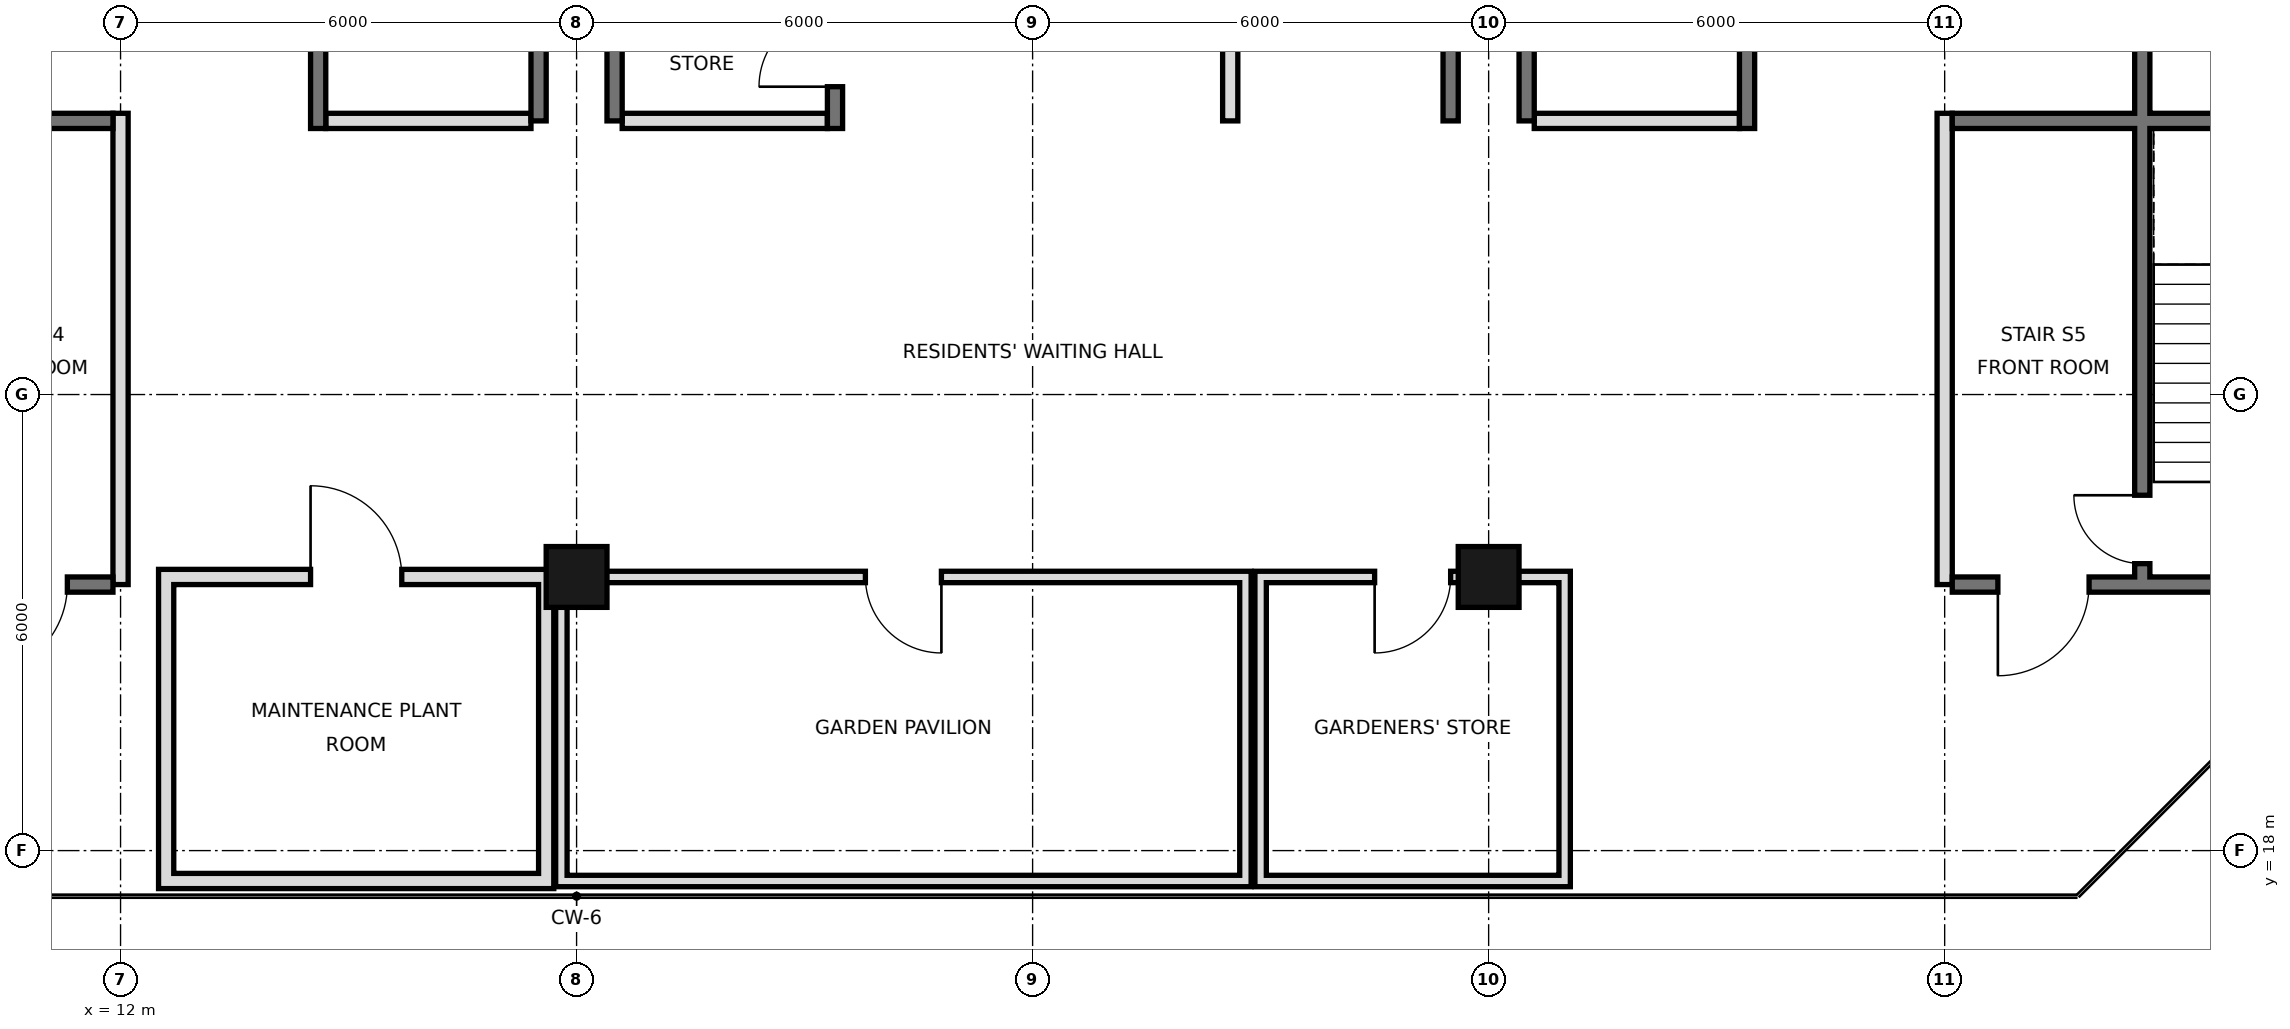
"""IFC4 building model, lengths in metres.
Left out: names, types, materials, properties, quantities, classifications, styles, units other than length and angle.
Written with IfcOpenShell. Run it as: python <this file> out.ifc"""

import sys

from ifc_helpers import new_model, si_unit, direction, frame, frame_2d, origin, origin_2d, place, context, subcontext, project, spatial, rectangle, hollow_rectangle, extrude, element, fill, save


model = new_model("IFC4")
c1 = context("Model", 3, precision=1e-05, world=origin(), true_north=direction((0.0, 1.0)))
c2 = subcontext(c1, "Body", "Model", "MODEL_VIEW")
j1 = project(units=[si_unit("LENGTHUNIT", "METRE"), si_unit("PLANEANGLEUNIT", "RADIAN")], contexts=[c1])
p1 = place(None, origin())
s1 = spatial("IfcSite", under=j1, at=p1, CompositionType="ELEMENT")
p2 = place(p1, origin())
s2 = spatial("IfcBuilding", under=s1, at=p2, CompositionType="ELEMENT")
p3 = place(p2, frame((0.0, 0.0, 345.8)))
s3 = spatial("IfcBuildingStorey", under=s2, at=p3, CompositionType="ELEMENT", Elevation=345.8)
for number, where, z_axis, x_axis in (
    (1, (18.0, 21.6, 0.0), (0.0, 0.0, 1.0), (1.0, 0.0, 0.0)),
    (2, (30.0, 21.6, 0.0), (0.0, 0.0, 1.0), (1.0, 0.0, 0.0)),
):
    element("IfcColumn", number, at=place(p3, frame(where, z_axis=z_axis, x_axis=x_axis)), inside=s3, PredefinedType="COLUMN", context=c2, shape_type="SweptSolid", body=[
        extrude(hollow_rectangle(XDim=0.8, YDim=0.8, WallThickness=0.025, at=origin_2d()), origin(), (0.0, 0.0, 1.0), 4.0),
    ])
p4 = place(p3, frame((42.397, 17.69, 0.0), z_axis=(0.0, 0.0, 1.0), x_axis=(-0.707106781187, -0.707106781187, 0.0)))
e3 = element("IfcWall", 3, at=p4, inside=s3, PredefinedType="PARAPET", context=c2, shape_type="SweptSolid", body=[
    extrude(rectangle(XDim=8.61, YDim=0.2, at=frame_2d((4.305, 0.0))), origin(), (0.0, 0.0, 1.0), 1.1),
])
for number, where, z_axis, x_axis in (
    (4, (12.6, 17.5, 0.0), (0.0, 0.0, 1.0), (0.0, 1.0, 0.0)),
    (5, (17.6, 17.5, 0.0), (0.0, 0.0, 1.0), (0.0, 1.0, 0.0)),
):
    element("IfcWall", number, at=place(p3, frame(where, z_axis=z_axis, x_axis=x_axis)), inside=s3, PredefinedType="SOLIDWALL", context=c2, shape_type="SweptSolid", body=[
        extrude(rectangle(XDim=4.2, YDim=0.2, at=frame_2d((2.1, 0.0))), origin(), (0.0, 0.0, 1.0), 3.05),
    ])
p5 = place(p3, frame((17.8, 17.525, 0.0), z_axis=(0.0, 0.0, 1.0), x_axis=(0.0, 1.0, 0.0)))
e6 = element("IfcWall", 6, at=p5, inside=s3, PredefinedType="PARTITIONING", context=c2, shape_type="SweptSolid", body=[
    extrude(rectangle(XDim=4.15, YDim=0.15, at=frame_2d((2.075, 0.0))), origin(), (0.0, 0.0, 1.0), 3.15),
])
for number, where, z_axis, x_axis in (
    (7, (26.8, 17.525, 0.0), (0.0, 0.0, 1.0), (0.0, 1.0, 0.0)),
    (8, (27.0, 17.525, 0.0), (0.0, 0.0, 1.0), (0.0, 1.0, 0.0)),
    (9, (31.0, 17.525, 0.0), (0.0, 0.0, 1.0), (0.0, 1.0, 0.0)),
):
    element("IfcWall", number, at=place(p3, frame(where, z_axis=z_axis, x_axis=x_axis)), inside=s3, PredefinedType="PARTITIONING", context=c2, shape_type="SweptSolid", body=[
        extrude(rectangle(XDim=4.15, YDim=0.15, at=frame_2d((2.075, 0.0))), origin(), (0.0, 0.0, 1.0), 3.75),
    ])
p6 = place(p3, frame((12.7, 17.6, 0.0), z_axis=(0.0, 0.0, 1.0), x_axis=(1.0, 0.0, 0.0)))
e10 = element("IfcWall", 10, at=p6, inside=s3, PredefinedType="SOLIDWALL", context=c2, shape_type="SweptSolid", body=[
    extrude(rectangle(XDim=4.8, YDim=0.2, at=frame_2d((2.4, 0.0))), origin(), (0.0, 0.0, 1.0), 3.75),
])
p7 = place(p3, frame((17.875, 17.6, 0.0), z_axis=(0.0, 0.0, 1.0), x_axis=(1.0, 0.0, 0.0)))
e11 = element("IfcWall", 11, at=p7, inside=s3, PredefinedType="PARTITIONING", context=c2, shape_type="SweptSolid", body=[
    extrude(rectangle(XDim=8.85, YDim=0.15, at=frame_2d((4.425, 0.0))), origin(), (0.0, 0.0, 1.0), 3.75),
])
p8 = place(p3, frame((27.075, 17.6, 0.0), z_axis=(0.0, 0.0, 1.0), x_axis=(1.0, 0.0, 0.0)))
e12 = element("IfcWall", 12, at=p8, inside=s3, PredefinedType="PARTITIONING", context=c2, shape_type="SweptSolid", body=[
    extrude(rectangle(XDim=3.85, YDim=0.15, at=frame_2d((1.925, 0.0))), origin(), (0.0, 0.0, 1.0), 3.75),
])
p9 = place(p3, frame((12.7, 21.6, 0.0), z_axis=(0.0, 0.0, 1.0), x_axis=(1.0, 0.0, 0.0)))
e13 = element("IfcWall", 13, at=p9, inside=s3, PredefinedType="SOLIDWALL", context=c2, shape_type="SweptSolid", body=[
    extrude(rectangle(XDim=4.8, YDim=0.2, at=frame_2d((2.4, 0.0))), origin(), (0.0, 0.0, 1.0), 3.75),
])
p10 = place(p9, frame((1.8, 0.0, 0.0)))
e14 = element("IfcOpeningElement", 14, at=p10, cuts=e13, PredefinedType="OPENING", context=c2, shape_type="SweptSolid", body=[
    extrude(rectangle(XDim=1.2, YDim=2.4, at=frame_2d((0.6, 1.2))), frame((0.0, 0.11, 0.0), z_axis=(0.0, -1.0, 0.0), x_axis=(1.0, 0.0, 0.0)), (0.0, 0.0, 1.0), 0.22),
])
p11 = place(p3, frame((17.875, 21.6, 0.0), z_axis=(0.0, 0.0, 1.0), x_axis=(1.0, 0.0, 0.0)))
e15 = element("IfcWall", 15, at=p11, inside=s3, PredefinedType="PARTITIONING", context=c2, shape_type="SweptSolid", body=[
    extrude(rectangle(XDim=8.85, YDim=0.15, at=frame_2d((4.425, 0.0))), origin(), (0.0, 0.0, 1.0), 3.75),
])
p12 = place(p11, frame((3.925, 0.0, 0.0)))
e16 = element("IfcOpeningElement", 16, at=p12, cuts=e15, PredefinedType="OPENING", context=c2, shape_type="SweptSolid", body=[
    extrude(rectangle(XDim=1.0, YDim=2.4, at=frame_2d((0.5, 1.2))), frame((0.0, 0.085, 0.0), z_axis=(0.0, -1.0, 0.0), x_axis=(1.0, 0.0, 0.0)), (0.0, 0.0, 1.0), 0.17),
])
p13 = place(p3, frame((27.075, 21.6, 0.0), z_axis=(0.0, 0.0, 1.0), x_axis=(1.0, 0.0, 0.0)))
e17 = element("IfcWall", 17, at=p13, inside=s3, PredefinedType="PARTITIONING", context=c2, shape_type="SweptSolid", body=[
    extrude(rectangle(XDim=3.85, YDim=0.15, at=frame_2d((1.925, 0.0))), origin(), (0.0, 0.0, 1.0), 3.75),
])
p14 = place(p13, frame((1.425, 0.0, 0.0)))
e18 = element("IfcOpeningElement", 18, at=p14, cuts=e17, PredefinedType="OPENING", context=c2, shape_type="SweptSolid", body=[
    extrude(rectangle(XDim=1.0, YDim=2.4, at=frame_2d((0.5, 1.2))), frame((0.0, 0.085, 0.0), z_axis=(0.0, -1.0, 0.0), x_axis=(1.0, 0.0, 0.0)), (0.0, 0.0, 1.0), 0.17),
])
for number, where, z_axis, x_axis in (
    (19, (17.5, 27.6, 0.0), (0.0, 0.0, 1.0), (0.0, 1.0, 0.0)),
    (20, (18.5, 27.6, 0.0), (0.0, 0.0, 1.0), (0.0, 1.0, 0.0)),
    (21, (29.5, 27.6, 0.0), (0.0, 0.0, 1.0), (0.0, 1.0, 0.0)),
    (22, (30.5, 27.6, 0.0), (0.0, 0.0, 1.0), (0.0, 1.0, 0.0)),
):
    element("IfcWall", number, at=place(p3, frame(where, z_axis=z_axis, x_axis=x_axis)), inside=s3, PredefinedType="SOLIDWALL", context=c2, shape_type="SweptSolid", body=[
        extrude(rectangle(XDim=17.5, YDim=0.2, at=frame_2d((8.75, 0.0))), origin(), (0.0, 0.0, 1.0), 3.75),
    ])
p15 = place(p3, frame((12.0, 21.5, 0.0), z_axis=(0.0, 0.0, 1.0), x_axis=(0.0, 1.0, 0.0)))
e23 = element("IfcWall", 23, at=p15, inside=s3, PredefinedType="PARTITIONING", context=c2, shape_type="SweptSolid", body=[
    extrude(rectangle(XDim=6.2, YDim=0.2, at=frame_2d((3.1, 0.0))), origin(), (0.0, 0.0, 1.0), 3.75),
])
p16 = place(p3, frame((14.6, 27.5, 0.0), z_axis=(0.0, 0.0, 1.0), x_axis=(0.0, 1.0, 0.0)))
e24 = element("IfcWall", 24, at=p16, inside=s3, PredefinedType="SOLIDWALL", context=c2, shape_type="SweptSolid", body=[
    extrude(rectangle(XDim=17.5, YDim=0.2, at=frame_2d((8.75, 0.0))), origin(), (0.0, 0.0, 1.0), 3.75),
])
p17 = place(p16, frame((15.4, 0.0, 0.0)))
e25 = element("IfcOpeningElement", 25, at=p17, cuts=e24, PredefinedType="OPENING", context=c2, shape_type="SweptSolid", body=[
    extrude(rectangle(XDim=1.1, YDim=2.1, at=frame_2d((0.55, 1.05))), frame((0.0, 0.11, 0.0), z_axis=(0.0, -1.0, 0.0), x_axis=(1.0, 0.0, 0.0)), (0.0, 0.0, 1.0), 0.22),
])
p18 = place(p16, frame((2.7, 0.0, 0.0)))
e26 = element("IfcOpeningElement", 26, at=p18, cuts=e24, PredefinedType="OPENING", context=c2, shape_type="SweptSolid", body=[
    extrude(rectangle(XDim=1.0, YDim=2.1, at=frame_2d((0.5, 1.05))), frame((0.0, 0.11, 0.0), z_axis=(0.0, -1.0, 0.0), x_axis=(1.0, 0.0, 0.0)), (0.0, 0.0, 1.0), 0.22),
])
p19 = place(p3, frame((21.4, 27.5, 0.0), z_axis=(0.0, 0.0, 1.0), x_axis=(0.0, 1.0, 0.0)))
e27 = element("IfcWall", 27, at=p19, inside=s3, PredefinedType="SOLIDWALL", context=c2, shape_type="SweptSolid", body=[
    extrude(rectangle(XDim=17.5, YDim=0.2, at=frame_2d((8.75, 0.0))), origin(), (0.0, 0.0, 1.0), 3.75),
])
p20 = place(p19, frame((0.55, 0.0, 0.0)))
e28 = element("IfcOpeningElement", 28, at=p20, cuts=e27, PredefinedType="OPENING", context=c2, shape_type="SweptSolid", body=[
    extrude(rectangle(XDim=1.0, YDim=2.1, at=frame_2d((0.5, 1.05))), frame((0.0, 0.11, 0.0), z_axis=(0.0, -1.0, 0.0), x_axis=(1.0, 0.0, 0.0)), (0.0, 0.0, 1.0), 0.22),
])
p21 = place(p19, frame((3.65, 0.0, 0.0)))
e29 = element("IfcOpeningElement", 29, at=p21, cuts=e27, PredefinedType="OPENING", context=c2, shape_type="SweptSolid", body=[
    extrude(rectangle(XDim=1.0, YDim=2.1, at=frame_2d((0.5, 1.05))), frame((0.0, 0.11, 0.0), z_axis=(0.0, -1.0, 0.0), x_axis=(1.0, 0.0, 0.0)), (0.0, 0.0, 1.0), 0.22),
])
p22 = place(p19, frame((9.8, 0.0, 0.0)))
e30 = element("IfcOpeningElement", 30, at=p22, cuts=e27, PredefinedType="OPENING", context=c2, shape_type="SweptSolid", body=[
    extrude(rectangle(XDim=1.0, YDim=2.1, at=frame_2d((0.5, 1.05))), frame((0.0, 0.11, 0.0), z_axis=(0.0, -1.0, 0.0), x_axis=(1.0, 0.0, 0.0)), (0.0, 0.0, 1.0), 0.22),
])
p23 = place(p3, frame((26.6, 27.6, 0.0), z_axis=(0.0, 0.0, 1.0), x_axis=(0.0, 1.0, 0.0)))
e31 = element("IfcWall", 31, at=p23, inside=s3, PredefinedType="PARTITIONING", context=c2, shape_type="SweptSolid", body=[
    extrude(rectangle(XDim=17.4, YDim=0.2, at=frame_2d((8.7, 0.0))), origin(), (0.0, 0.0, 1.0), 3.75),
])
p24 = place(p23, frame((10.25, 0.0, 0.0)))
e32 = element("IfcOpeningElement", 32, at=p24, cuts=e31, PredefinedType="OPENING", context=c2, shape_type="SweptSolid", body=[
    extrude(rectangle(XDim=1.0, YDim=2.1, at=frame_2d((0.5, 1.05))), frame((0.0, 0.11, 0.0), z_axis=(0.0, -1.0, 0.0), x_axis=(1.0, 0.0, 0.0)), (0.0, 0.0, 1.0), 0.22),
])
p25 = place(p23, frame((15.375, 0.0, 0.0)))
e33 = element("IfcOpeningElement", 33, at=p25, cuts=e31, PredefinedType="OPENING", context=c2, shape_type="SweptSolid", body=[
    extrude(rectangle(XDim=1.0, YDim=2.1, at=frame_2d((0.5, 1.05))), frame((0.0, 0.11, 0.0), z_axis=(0.0, -1.0, 0.0), x_axis=(1.0, 0.0, 0.0)), (0.0, 0.0, 1.0), 0.22),
])
p26 = place(p3, frame((33.4, 27.5, 0.0), z_axis=(0.0, 0.0, 1.0), x_axis=(0.0, 1.0, 0.0)))
e34 = element("IfcWall", 34, at=p26, inside=s3, PredefinedType="SOLIDWALL", context=c2, shape_type="SweptSolid", body=[
    extrude(rectangle(XDim=17.5, YDim=0.2, at=frame_2d((8.75, 0.0))), origin(), (0.0, 0.0, 1.0), 3.75),
])
p27 = place(p26, frame((15.4, 0.0, 0.0)))
e35 = element("IfcOpeningElement", 35, at=p27, cuts=e34, PredefinedType="OPENING", context=c2, shape_type="SweptSolid", body=[
    extrude(rectangle(XDim=1.1, YDim=2.1, at=frame_2d((0.55, 1.05))), frame((0.0, 0.11, 0.0), z_axis=(0.0, -1.0, 0.0), x_axis=(1.0, 0.0, 0.0)), (0.0, 0.0, 1.0), 0.22),
])
p28 = place(p26, frame((2.7, 0.0, 0.0)))
e36 = element("IfcOpeningElement", 36, at=p28, cuts=e34, PredefinedType="OPENING", context=c2, shape_type="SweptSolid", body=[
    extrude(rectangle(XDim=1.0, YDim=2.1, at=frame_2d((0.5, 1.05))), frame((0.0, 0.11, 0.0), z_axis=(0.0, -1.0, 0.0), x_axis=(1.0, 0.0, 0.0)), (0.0, 0.0, 1.0), 0.22),
])
p29 = place(p3, frame((36.0, 21.5, 0.0), z_axis=(0.0, 0.0, 1.0), x_axis=(0.0, 1.0, 0.0)))
e37 = element("IfcWall", 37, at=p29, inside=s3, PredefinedType="PARTITIONING", context=c2, shape_type="SweptSolid", body=[
    extrude(rectangle(XDim=6.2, YDim=0.2, at=frame_2d((3.1, 0.0))), origin(), (0.0, 0.0, 1.0), 3.75),
])
p30 = place(p3, frame((38.6, 21.5, 0.0), z_axis=(0.0, 0.0, 1.0), x_axis=(0.0, 1.0, 0.0)))
e38 = element("IfcWall", 38, at=p30, inside=s3, PredefinedType="SOLIDWALL", context=c2, shape_type="SweptSolid", body=[
    extrude(rectangle(XDim=23.5, YDim=0.2, at=frame_2d((11.75, 0.0))), origin(), (0.0, 0.0, 1.0), 3.75),
])
p31 = place(p30, frame((8.7, 0.0, 0.0)))
e39 = element("IfcOpeningElement", 39, at=p31, cuts=e38, PredefinedType="OPENING", context=c2, shape_type="SweptSolid", body=[
    extrude(rectangle(XDim=1.0, YDim=2.1, at=frame_2d((0.5, 1.05))), frame((0.0, 0.11, 0.0), z_axis=(0.0, -1.0, 0.0), x_axis=(1.0, 0.0, 0.0)), (0.0, 0.0, 1.0), 0.22),
])
p32 = place(p30, frame((13.35, 0.0, 0.0)))
e40 = element("IfcOpeningElement", 40, at=p32, cuts=e38, PredefinedType="OPENING", context=c2, shape_type="SweptSolid", body=[
    extrude(rectangle(XDim=1.0, YDim=2.1, at=frame_2d((0.5, 1.05))), frame((0.0, 0.11, 0.0), z_axis=(0.0, -1.0, 0.0), x_axis=(1.0, 0.0, 0.0)), (0.0, 0.0, 1.0), 0.22),
])
p33 = place(p30, frame((15.8, 0.0, 0.0)))
e41 = element("IfcOpeningElement", 41, at=p33, cuts=e38, PredefinedType="OPENING", context=c2, shape_type="SweptSolid", body=[
    extrude(rectangle(XDim=1.0, YDim=2.1, at=frame_2d((0.5, 1.05))), frame((0.0, 0.11, 0.0), z_axis=(0.0, -1.0, 0.0), x_axis=(1.0, 0.0, 0.0)), (0.0, 0.0, 1.0), 0.22),
])
p34 = place(p30, frame((0.275, 0.0, 0.0)))
e42 = element("IfcOpeningElement", 42, at=p34, cuts=e38, PredefinedType="OPENING", context=c2, shape_type="SweptSolid", body=[
    extrude(rectangle(XDim=0.9, YDim=2.1, at=frame_2d((0.45, 1.05))), frame((0.0, 0.11, 0.0), z_axis=(0.0, -1.0, 0.0), x_axis=(1.0, 0.0, 0.0)), (0.0, 0.0, 1.0), 0.22),
])
p35 = place(p3, frame((36.1, 21.5, 0.0), z_axis=(0.0, 0.0, 1.0), x_axis=(1.0, 0.0, 0.0)))
e43 = element("IfcWall", 43, at=p35, inside=s3, PredefinedType="SOLIDWALL", context=c2, shape_type="SweptSolid", body=[
    extrude(rectangle(XDim=5.3, YDim=0.2, at=frame_2d((2.65, 0.0))), origin(), (0.0, 0.0, 1.0), 3.75),
])
p36 = place(p35, frame((0.6, 0.0, 0.0)))
e44 = element("IfcOpeningElement", 44, at=p36, cuts=e43, PredefinedType="OPENING", context=c2, shape_type="SweptSolid", body=[
    extrude(rectangle(XDim=1.2, YDim=2.1, at=frame_2d((0.6, 1.05))), frame((0.0, 0.11, 0.0), z_axis=(0.0, -1.0, 0.0), x_axis=(1.0, 0.0, 0.0)), (0.0, 0.0, 1.0), 0.22),
])
p37 = place(p3, frame((6.6, 21.5, 0.0), z_axis=(0.0, 0.0, 1.0), x_axis=(1.0, 0.0, 0.0)))
e45 = element("IfcWall", 45, at=p37, inside=s3, PredefinedType="SOLIDWALL", context=c2, shape_type="SweptSolid", body=[
    extrude(rectangle(XDim=5.3, YDim=0.2, at=frame_2d((2.65, 0.0))), origin(), (0.0, 0.0, 1.0), 3.75),
])
p38 = place(p37, frame((3.5, 0.0, 0.0)))
e46 = element("IfcOpeningElement", 46, at=p38, cuts=e45, PredefinedType="OPENING", context=c2, shape_type="SweptSolid", body=[
    extrude(rectangle(XDim=1.2, YDim=2.1, at=frame_2d((0.6, 1.05))), frame((0.0, 0.11, 0.0), z_axis=(0.0, -1.0, 0.0), x_axis=(1.0, 0.0, 0.0)), (0.0, 0.0, 1.0), 0.22),
])
for number, where, z_axis, x_axis in (
    (47, (14.7, 27.6, 0.0), (0.0, 0.0, 1.0), (1.0, 0.0, 0.0)),
    (48, (18.6, 27.6, 0.0), (0.0, 0.0, 1.0), (1.0, 0.0, 0.0)),
    (49, (30.6, 27.6, 0.0), (0.0, 0.0, 1.0), (1.0, 0.0, 0.0)),
):
    element("IfcWall", number, at=place(p3, frame(where, z_axis=z_axis, x_axis=x_axis)), inside=s3, PredefinedType="PARTITIONING", context=c2, shape_type="SweptSolid", body=[
        extrude(rectangle(XDim=2.7, YDim=0.2, at=frame_2d((1.35, 0.0))), origin(), (0.0, 0.0, 1.0), 3.75),
    ])
for number, where, z_axis, x_axis in (
    (50, (36.1, 27.6, 0.0), (0.0, 0.0, 1.0), (1.0, 0.0, 0.0)),
    (51, (6.6, 27.6, 0.0), (0.0, 0.0, 1.0), (1.0, 0.0, 0.0)),
):
    element("IfcWall", number, at=place(p3, frame(where, z_axis=z_axis, x_axis=x_axis)), inside=s3, PredefinedType="SOLIDWALL", context=c2, shape_type="SweptSolid", body=[
        extrude(rectangle(XDim=5.3, YDim=0.2, at=frame_2d((2.65, 0.0))), origin(), (0.0, 0.0, 1.0), 3.75),
    ])
p39 = place(p10, origin())
e52 = element("IfcDoor", 52, at=p39, inside=s3, OperationType="SINGLE_SWING_LEFT", PredefinedType="DOOR", context=c2, shape_type="SweptSolid", body=[
    extrude(rectangle(XDim=1.2, YDim=2.4, at=frame_2d((0.6, 1.2))), frame((0.0, 0.025, 0.0), z_axis=(0.0, -1.0, 0.0), x_axis=(1.0, 0.0, 0.0)), (0.0, 0.0, 1.0), 0.05),
])
fill(e14, e52)
p40 = place(p12, origin())
e53 = element("IfcDoor", 53, at=p40, inside=s3, OperationType="SINGLE_SWING_RIGHT", PredefinedType="DOOR", context=c2, shape_type="SweptSolid", body=[
    extrude(rectangle(XDim=1.0, YDim=2.4, at=frame_2d((0.5, 1.2))), frame((0.0, 0.025, 0.0), z_axis=(0.0, -1.0, 0.0), x_axis=(1.0, 0.0, 0.0)), (0.0, 0.0, 1.0), 0.05),
])
fill(e16, e53)
p41 = place(p14, frame((1.0, 0.0, 0.0), z_axis=(0.0, 0.0, 1.0), x_axis=(-1.0, 0.0, 0.0)))
e54 = element("IfcDoor", 54, at=p41, inside=s3, OperationType="SINGLE_SWING_RIGHT", PredefinedType="DOOR", context=c2, shape_type="SweptSolid", body=[
    extrude(rectangle(XDim=1.0, YDim=2.4, at=frame_2d((0.5, 1.2))), frame((0.0, 0.025, 0.0), z_axis=(0.0, -1.0, 0.0), x_axis=(1.0, 0.0, 0.0)), (0.0, 0.0, 1.0), 0.05),
])
fill(e18, e54)
p42 = place(p38, frame((1.2, 0.0, 0.0), z_axis=(0.0, 0.0, 1.0), x_axis=(-1.0, 0.0, 0.0)))
e55 = element("IfcDoor", 55, at=p42, inside=s3, OperationType="SINGLE_SWING_RIGHT", PredefinedType="DOOR", context=c2, shape_type="SweptSolid", body=[
    extrude(rectangle(XDim=1.2, YDim=2.1, at=frame_2d((0.6, 1.05))), frame((0.0, 0.025, 0.0), z_axis=(0.0, -1.0, 0.0), x_axis=(1.0, 0.0, 0.0)), (0.0, 0.0, 1.0), 0.05),
])
fill(e46, e55)
p43 = place(p36, frame((1.2, 0.0, 0.0), z_axis=(0.0, 0.0, 1.0), x_axis=(-1.0, 0.0, 0.0)))
e56 = element("IfcDoor", 56, at=p43, inside=s3, OperationType="SINGLE_SWING_RIGHT", PredefinedType="DOOR", context=c2, shape_type="SweptSolid", body=[
    extrude(rectangle(XDim=1.2, YDim=2.1, at=frame_2d((0.6, 1.05))), frame((0.0, 0.025, 0.0), z_axis=(0.0, -1.0, 0.0), x_axis=(1.0, 0.0, 0.0)), (0.0, 0.0, 1.0), 0.05),
])
fill(e44, e56)
p44 = place(p20, origin())
e57 = element("IfcDoor", 57, at=p44, inside=s3, OperationType="SINGLE_SWING_LEFT", PredefinedType="DOOR", context=c2, shape_type="SweptSolid", body=[
    extrude(rectangle(XDim=1.0, YDim=2.1, at=frame_2d((0.5, 1.05))), frame((0.0, 0.025, 0.0), z_axis=(0.0, -1.0, 0.0), x_axis=(1.0, 0.0, 0.0)), (0.0, 0.0, 1.0), 0.05),
])
fill(e28, e57)
p45 = place(p34, frame((0.9, 0.0, 0.0), z_axis=(0.0, 0.0, 1.0), x_axis=(-1.0, 0.0, 0.0)))
e58 = element("IfcDoor", 58, at=p45, inside=s3, OperationType="SINGLE_SWING_LEFT", PredefinedType="DOOR", context=c2, shape_type="SweptSolid", body=[
    extrude(rectangle(XDim=0.9, YDim=2.1, at=frame_2d((0.45, 1.05))), frame((0.0, 0.025, 0.0), z_axis=(0.0, -1.0, 0.0), x_axis=(1.0, 0.0, 0.0)), (0.0, 0.0, 1.0), 0.05),
])
fill(e42, e58)
save(model, sys.argv[1])
